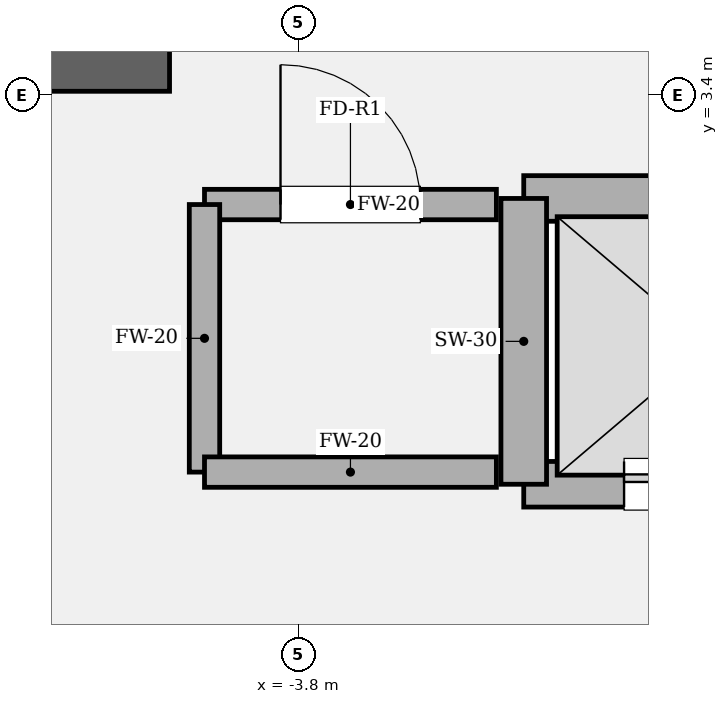
"""IFC4 building model, lengths in metres.
Left out: names, types, materials, properties, quantities, classifications, styles, units other than length and angle.
Written with IfcOpenShell. Run it as: python <this file> out.ifc"""

import sys

from ifc_helpers import new_model, si_unit, direction, frame, frame_2d, origin, place, context, subcontext, project, spatial, rectangle, extrude, element, fill, save


model = new_model("IFC4")
c1 = context("Model", 3, precision=1e-05, world=origin(), true_north=direction((0.0, 1.0)))
c2 = subcontext(c1, "Body", "Model", "MODEL_VIEW")
j1 = project(units=[si_unit("LENGTHUNIT", "METRE"), si_unit("PLANEANGLEUNIT", "RADIAN")], contexts=[c1])
p1 = place(None, origin())
s1 = spatial("IfcSite", under=j1, at=p1, CompositionType="ELEMENT")
p2 = place(p1, origin())
s2 = spatial("IfcBuilding", under=s1, at=p2, CompositionType="ELEMENT")
p3 = place(p2, frame((0.0, 0.0, 321.6)))
s3 = spatial("IfcBuildingStorey", under=s2, at=p3, CompositionType="ELEMENT", Elevation=321.6)
p4 = place(p3, frame((-9.975, 3.6, 0.0), z_axis=(0.0, 0.0, 1.0), x_axis=(1.0, 0.0, 0.0)))
e1 = element("IfcWall", 1, at=p4, inside=s3, PredefinedType="SOLIDWALL", context=c2, shape_type="SweptSolid", body=[
    extrude(rectangle(XDim=5.325, YDim=0.35, at=frame_2d((2.663, 0.0))), origin(), (0.0, 0.0, 1.0), 4.2),
])
p5 = place(p3, frame((-2.32, 0.84, 0.0), z_axis=(0.0, 0.0, 1.0), x_axis=(1.0, 0.0, 0.0)))
e2 = element("IfcWall", 2, at=p5, inside=s3, PredefinedType="SOLIDWALL", context=c2, shape_type="SweptSolid", body=[
    extrude(rectangle(XDim=4.64, YDim=0.3, at=frame_2d((2.32, 0.0))), origin(), (0.0, 0.0, 1.0), 4.0),
])
p6 = place(p5, frame((0.66, 0.0, 0.0)))
e3 = element("IfcOpeningElement", 3, at=p6, cuts=e2, PredefinedType="OPENING", context=c2, shape_type="SweptSolid", body=[
    extrude(rectangle(XDim=1.12, YDim=2.25, at=frame_2d((0.56, 1.125))), frame((0.0, 0.16, 0.0), z_axis=(0.0, -1.0, 0.0), x_axis=(1.0, 0.0, 0.0)), (0.0, 0.0, 1.0), 0.32),
])
p7 = place(p5, frame((2.86, 0.0, 0.0)))
e4 = element("IfcOpeningElement", 4, at=p7, cuts=e2, PredefinedType="OPENING", context=c2, shape_type="SweptSolid", body=[
    extrude(rectangle(XDim=1.12, YDim=2.25, at=frame_2d((0.56, 1.125))), frame((0.0, 0.16, 0.0), z_axis=(0.0, -1.0, 0.0), x_axis=(1.0, 0.0, 0.0)), (0.0, 0.0, 1.0), 0.32),
])
p8 = place(p3, frame((-2.32, 2.72, 0.0), z_axis=(0.0, 0.0, 1.0), x_axis=(1.0, 0.0, 0.0)))
e5 = element("IfcWall", 5, at=p8, inside=s3, PredefinedType="SOLIDWALL", context=c2, shape_type="SweptSolid", body=[
    extrude(rectangle(XDim=4.64, YDim=0.3, at=frame_2d((2.32, 0.0))), origin(), (0.0, 0.0, 1.0), 4.0),
])
p9 = place(p3, frame((-2.32, 0.84, 0.0), z_axis=(0.0, 0.0, 1.0), x_axis=(0.0, 1.0, 0.0)))
e6 = element("IfcWall", 6, at=p9, inside=s3, PredefinedType="SOLIDWALL", context=c2, shape_type="SweptSolid", body=[
    extrude(rectangle(XDim=1.88, YDim=0.3, at=frame_2d((0.94, 0.0))), origin(), (0.0, 0.0, 1.0), 4.0),
])
p10 = place(p3, frame((-2.5, 2.68, 0.0), z_axis=(0.0, 0.0, 1.0), x_axis=(-1.0, 0.0, 0.0)))
e7 = element("IfcWall", 7, at=p10, inside=s3, PredefinedType="SOLIDWALL", context=c2, shape_type="SweptSolid", body=[
    extrude(rectangle(XDim=1.92, YDim=0.2, at=frame_2d((0.96, 0.0))), origin(), (0.0, 0.0, 1.0), 4.0),
])
p11 = place(p10, frame((0.5, 0.0, 0.0)))
e8 = element("IfcOpeningElement", 8, at=p11, cuts=e7, PredefinedType="OPENING", context=c2, shape_type="SweptSolid", body=[
    extrude(rectangle(XDim=0.92, YDim=2.1, at=frame_2d((0.46, 1.05))), frame((0.0, 0.11, 0.0), z_axis=(0.0, -1.0, 0.0), x_axis=(1.0, 0.0, 0.0)), (0.0, 0.0, 1.0), 0.22),
])
p12 = place(p3, frame((-4.42, 2.68, 0.0), z_axis=(0.0, 0.0, 1.0), x_axis=(0.0, -1.0, 0.0)))
e9 = element("IfcWall", 9, at=p12, inside=s3, PredefinedType="SOLIDWALL", context=c2, shape_type="SweptSolid", body=[
    extrude(rectangle(XDim=1.76, YDim=0.2, at=frame_2d((0.88, 0.0))), origin(), (0.0, 0.0, 1.0), 4.0),
])
p13 = place(p3, frame((-4.42, 0.92, 0.0), z_axis=(0.0, 0.0, 1.0), x_axis=(1.0, 0.0, 0.0)))
e10 = element("IfcWall", 10, at=p13, inside=s3, PredefinedType="SOLIDWALL", context=c2, shape_type="SweptSolid", body=[
    extrude(rectangle(XDim=1.92, YDim=0.2, at=frame_2d((0.96, 0.0))), origin(), (0.0, 0.0, 1.0), 4.0),
])
p14 = place(p6, origin())
e11 = element("IfcDoor", 11, at=p14, inside=s3, OperationType="DOUBLE_DOOR_SLIDING", PredefinedType="DOOR", context=c2, shape_type="SweptSolid", body=[
    extrude(rectangle(XDim=1.12, YDim=2.25, at=frame_2d((0.56, 1.125))), frame((0.0, 0.025, 0.0), z_axis=(0.0, -1.0, 0.0), x_axis=(1.0, 0.0, 0.0)), (0.0, 0.0, 1.0), 0.05),
])
fill(e3, e11)
p15 = place(p11, origin())
e12 = element("IfcDoor", 12, at=p15, inside=s3, OperationType="SINGLE_SWING_RIGHT", PredefinedType="DOOR", context=c2, shape_type="SweptSolid", body=[
    extrude(rectangle(XDim=0.92, YDim=2.1, at=frame_2d((0.46, 1.05))), frame((0.0, 0.025, 0.0), z_axis=(0.0, -1.0, 0.0), x_axis=(1.0, 0.0, 0.0)), (0.0, 0.0, 1.0), 0.05),
])
fill(e8, e12)
save(model, sys.argv[1])
